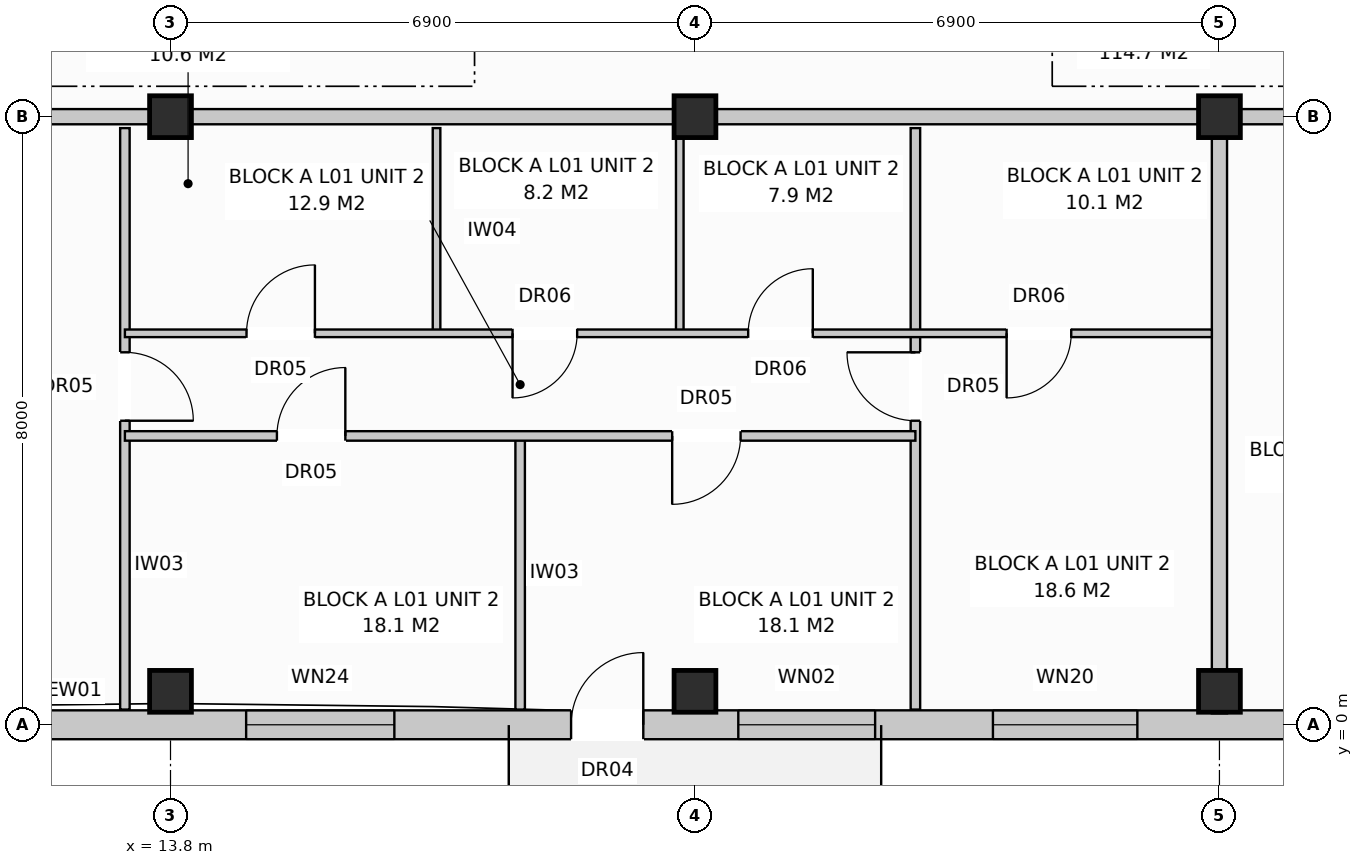
"""IFC4 building model, lengths in metres.
Left out: names, types, materials, properties, quantities, classifications, styles, units other than length and angle.
Written with IfcOpenShell. Run it as: python <this file> out.ifc"""

import sys

from ifc_helpers import new_model, si_unit, direction, frame, frame_2d, origin, origin_with_axes, origin_2d, place, context, subcontext, project, spatial, rectangle, extrude, element, fill, save


model = new_model("IFC4")
c1 = context("Model", 3, precision=1e-05, world=origin(), true_north=direction((0.0, 1.0)))
c2 = subcontext(c1, "Body", "Model", "MODEL_VIEW")
j1 = project(units=[si_unit("LENGTHUNIT", "METRE"), si_unit("PLANEANGLEUNIT", "RADIAN")], contexts=[c1])
p1 = place(None, origin())
s1 = spatial("IfcSite", under=j1, at=p1, CompositionType="ELEMENT")
p2 = place(p1, origin())
s2 = spatial("IfcBuilding", under=s1, at=p2, CompositionType="ELEMENT")
p3 = place(p2, frame((0.0, 0.0, 4.4)))
s3 = spatial("IfcBuildingStorey", under=s2, at=p3, CompositionType="ELEMENT", Elevation=4.4)
for number, where, z_axis, x_axis in (
    (1, (13.8, 0.44, 0.0), (0.0, 0.0, 1.0), (1.0, 0.0, 0.0)),
    (2, (13.8, 8.0, 0.0), (0.0, 0.0, 1.0), (1.0, 0.0, 0.0)),
    (3, (20.7, 0.44, 0.0), (0.0, 0.0, 1.0), (1.0, 0.0, 0.0)),
    (4, (20.7, 8.0, 0.0), (0.0, 0.0, 1.0), (1.0, 0.0, 0.0)),
    (5, (27.6, 0.44, 0.0), (0.0, 0.0, 1.0), (1.0, 0.0, 0.0)),
    (6, (27.6, 8.0, 0.0), (0.0, 0.0, 1.0), (1.0, 0.0, 0.0)),
):
    element("IfcColumn", number, at=place(p3, frame(where, z_axis=z_axis, x_axis=x_axis)), inside=s3, PredefinedType="COLUMN", context=c2, shape_type="SweptSolid", body=[
        extrude(rectangle(XDim=0.55, YDim=0.55, at=origin_2d()), origin(), (0.0, 0.0, 1.0), 3.6),
    ])
p4 = place(p3, frame((0.18, 0.0, 0.0), z_axis=(0.0, 0.0, 1.0), x_axis=(1.0, 0.0, 0.0)))
e7 = element("IfcWall", 7, at=p4, inside=s3, PredefinedType="STANDARD", context=c2, shape_type="SweptSolid", body=[
    extrude(rectangle(XDim=54.84, YDim=0.38, at=frame_2d((27.42, 0.0))), origin(), (0.0, 0.0, 1.0), 3.33),
])
p5 = place(p4, frame((5.09, 0.0, 0.0)))
e8 = element("IfcOpeningElement", 8, at=p5, cuts=e7, PredefinedType="OPENING", context=c2, shape_type="SweptSolid", body=[
    extrude(rectangle(XDim=0.95, YDim=2.1, at=frame_2d((0.475, 1.05))), frame((0.0, 0.202, 0.0), z_axis=(0.0, -1.0, 0.0), x_axis=(1.0, 0.0, 0.0)), (0.0, 0.0, 1.0), 0.404),
])
p6 = place(p4, frame((18.89, 0.0, 0.0)))
e9 = element("IfcOpeningElement", 9, at=p6, cuts=e7, PredefinedType="OPENING", context=c2, shape_type="SweptSolid", body=[
    extrude(rectangle(XDim=0.95, YDim=2.1, at=frame_2d((0.475, 1.05))), frame((0.0, 0.202, 0.0), z_axis=(0.0, -1.0, 0.0), x_axis=(1.0, 0.0, 0.0)), (0.0, 0.0, 1.0), 0.404),
])
p7 = place(p4, frame((32.69, 0.0, 0.0)))
e10 = element("IfcOpeningElement", 10, at=p7, cuts=e7, PredefinedType="OPENING", context=c2, shape_type="SweptSolid", body=[
    extrude(rectangle(XDim=0.95, YDim=2.1, at=frame_2d((0.475, 1.05))), frame((0.0, 0.202, 0.0), z_axis=(0.0, -1.0, 0.0), x_axis=(1.0, 0.0, 0.0)), (0.0, 0.0, 1.0), 0.404),
])
p8 = place(p4, frame((46.507, 0.0, 0.0)))
e11 = element("IfcOpeningElement", 11, at=p8, cuts=e7, PredefinedType="OPENING", context=c2, shape_type="SweptSolid", body=[
    extrude(rectangle(XDim=0.95, YDim=2.1, at=frame_2d((0.475, 1.05))), frame((0.0, 0.202, 0.0), z_axis=(0.0, -1.0, 0.0), x_axis=(1.0, 0.0, 0.0)), (0.0, 0.0, 1.0), 0.404),
])
p9 = place(p4, frame((0.89, 0.0, 0.8)))
e12 = element("IfcOpeningElement", 12, at=p9, cuts=e7, PredefinedType="OPENING", context=c2, shape_type="SweptSolid", body=[
    extrude(rectangle(XDim=1.8, YDim=1.7, at=frame_2d((0.9, 0.85))), frame((0.0, 0.202, 0.0), z_axis=(0.0, -1.0, 0.0), x_axis=(1.0, 0.0, 0.0)), (0.0, 0.0, 1.0), 0.404),
])
p10 = place(p4, frame((8.94, 0.0, 0.8)))
e13 = element("IfcOpeningElement", 13, at=p10, cuts=e7, PredefinedType="OPENING", context=c2, shape_type="SweptSolid", body=[
    extrude(rectangle(XDim=1.9, YDim=1.85, at=frame_2d((0.95, 0.925))), frame((0.0, 0.202, 0.0), z_axis=(0.0, -1.0, 0.0), x_axis=(1.0, 0.0, 0.0)), (0.0, 0.0, 1.0), 0.404),
])
p11 = place(p4, frame((14.615, 0.0, 0.8)))
e14 = element("IfcOpeningElement", 14, at=p11, cuts=e7, PredefinedType="OPENING", context=c2, shape_type="SweptSolid", body=[
    extrude(rectangle(XDim=1.95, YDim=1.65, at=frame_2d((0.975, 0.825))), frame((0.0, 0.202, 0.0), z_axis=(0.0, -1.0, 0.0), x_axis=(1.0, 0.0, 0.0)), (0.0, 0.0, 1.0), 0.404),
])
p12 = place(p4, frame((21.09, 0.0, 0.8)))
e15 = element("IfcOpeningElement", 15, at=p12, cuts=e7, PredefinedType="OPENING", context=c2, shape_type="SweptSolid", body=[
    extrude(rectangle(XDim=1.8, YDim=1.7, at=frame_2d((0.9, 0.85))), frame((0.0, 0.202, 0.0), z_axis=(0.0, -1.0, 0.0), x_axis=(1.0, 0.0, 0.0)), (0.0, 0.0, 1.0), 0.404),
])
p13 = place(p4, frame((24.44, 0.0, 0.8)))
e16 = element("IfcOpeningElement", 16, at=p13, cuts=e7, PredefinedType="OPENING", context=c2, shape_type="SweptSolid", body=[
    extrude(rectangle(XDim=1.9, YDim=1.85, at=frame_2d((0.95, 0.925))), frame((0.0, 0.202, 0.0), z_axis=(0.0, -1.0, 0.0), x_axis=(1.0, 0.0, 0.0)), (0.0, 0.0, 1.0), 0.404),
])
p14 = place(p4, frame((28.415, 0.0, 0.8)))
e17 = element("IfcOpeningElement", 17, at=p14, cuts=e7, PredefinedType="OPENING", context=c2, shape_type="SweptSolid", body=[
    extrude(rectangle(XDim=1.95, YDim=1.65, at=frame_2d((0.975, 0.825))), frame((0.0, 0.202, 0.0), z_axis=(0.0, -1.0, 0.0), x_axis=(1.0, 0.0, 0.0)), (0.0, 0.0, 1.0), 0.404),
])
p15 = place(p4, frame((35.59, 0.0, 0.8)))
e18 = element("IfcOpeningElement", 18, at=p15, cuts=e7, PredefinedType="OPENING", context=c2, shape_type="SweptSolid", body=[
    extrude(rectangle(XDim=1.8, YDim=1.7, at=frame_2d((0.9, 0.85))), frame((0.0, 0.202, 0.0), z_axis=(0.0, -1.0, 0.0), x_axis=(1.0, 0.0, 0.0)), (0.0, 0.0, 1.0), 0.404),
])
p16 = place(p4, frame((38.83, 0.0, 0.8)))
e19 = element("IfcOpeningElement", 19, at=p16, cuts=e7, PredefinedType="OPENING", context=c2, shape_type="SweptSolid", body=[
    extrude(rectangle(XDim=1.55, YDim=1.55, at=frame_2d((0.775, 0.775))), frame((0.0, 0.202, 0.0), z_axis=(0.0, -1.0, 0.0), x_axis=(1.0, 0.0, 0.0)), (0.0, 0.0, 1.0), 0.404),
])
p17 = place(p4, frame((42.415, 0.0, 0.8)))
e20 = element("IfcOpeningElement", 20, at=p17, cuts=e7, PredefinedType="OPENING", context=c2, shape_type="SweptSolid", body=[
    extrude(rectangle(XDim=1.95, YDim=1.65, at=frame_2d((0.975, 0.825))), frame((0.0, 0.202, 0.0), z_axis=(0.0, -1.0, 0.0), x_axis=(1.0, 0.0, 0.0)), (0.0, 0.0, 1.0), 0.404),
])
p18 = place(p4, frame((48.69, 0.0, 0.9)))
e21 = element("IfcOpeningElement", 21, at=p18, cuts=e7, PredefinedType="OPENING", context=c2, shape_type="SweptSolid", body=[
    extrude(rectangle(XDim=0.95, YDim=1.55, at=frame_2d((0.475, 0.775))), frame((0.0, 0.202, 0.0), z_axis=(0.0, -1.0, 0.0), x_axis=(1.0, 0.0, 0.0)), (0.0, 0.0, 1.0), 0.404),
])
p19 = place(p4, frame((51.44, 0.0, 0.8)))
e22 = element("IfcOpeningElement", 22, at=p19, cuts=e7, PredefinedType="OPENING", context=c2, shape_type="SweptSolid", body=[
    extrude(rectangle(XDim=1.9, YDim=1.85, at=frame_2d((0.95, 0.925))), frame((0.0, 0.202, 0.0), z_axis=(0.0, -1.0, 0.0), x_axis=(1.0, 0.0, 0.0)), (0.0, 0.0, 1.0), 0.404),
])
p20 = place(p3, frame((27.6, 7.85, 0.0), z_axis=(0.0, 0.0, 1.0), x_axis=(0.0, -1.0, 0.0)))
e23 = element("IfcWall", 23, at=p20, inside=s3, PredefinedType="PARTITIONING", context=c2, shape_type="SweptSolid", body=[
    extrude(rectangle(XDim=7.7, YDim=0.2, at=frame_2d((3.85, 0.0))), origin(), (0.0, 0.0, 1.0), 3.33),
])
p21 = place(p3, frame((6.9, 8.0, 0.0), z_axis=(0.0, 0.0, 1.0), x_axis=(1.0, 0.0, 0.0)))
e24 = element("IfcWall", 24, at=p21, inside=s3, PredefinedType="PARTITIONING", context=c2, shape_type="SweptSolid", body=[
    extrude(rectangle(XDim=20.7, YDim=0.2, at=frame_2d((10.35, 0.0))), origin(), (0.0, 0.0, 1.0), 2.77),
])
p22 = place(p21, frame((2.4, 0.0, 0.0)))
e25 = element("IfcOpeningElement", 25, at=p22, cuts=e24, PredefinedType="OPENING", context=c2, shape_type="SweptSolid", body=[
    extrude(rectangle(XDim=0.95, YDim=2.15, at=frame_2d((0.475, 1.075))), frame((0.0, 0.112, 0.0), z_axis=(0.0, -1.0, 0.0), x_axis=(1.0, 0.0, 0.0)), (0.0, 0.0, 1.0), 0.224),
])
p23 = place(p3, frame((13.2, 7.85, 0.0), z_axis=(0.0, 0.0, 1.0), x_axis=(0.0, -1.0, 0.0)))
e26 = element("IfcWall", 26, at=p23, inside=s3, PredefinedType="PARTITIONING", context=c2, shape_type="SweptSolid", body=[
    extrude(rectangle(XDim=7.65, YDim=0.125, at=frame_2d((3.825, 0.0))), origin(), (0.0, 0.0, 1.0), 3.33),
])
p24 = place(p23, frame((2.95, 0.0, 0.0)))
e27 = element("IfcOpeningElement", 27, at=p24, cuts=e26, PredefinedType="OPENING", context=c2, shape_type="SweptSolid", body=[
    extrude(rectangle(XDim=0.9, YDim=2.1, at=frame_2d((0.45, 1.05))), frame((0.0, 0.074, 0.0), z_axis=(0.0, -1.0, 0.0), x_axis=(1.0, 0.0, 0.0)), (0.0, 0.0, 1.0), 0.149),
])
for number, where, z_axis, x_axis in (
    (28, (17.3, 7.85, 0.0), (0.0, 0.0, 1.0), (0.0, -1.0, 0.0)),
    (29, (20.5, 7.85, 0.0), (0.0, 0.0, 1.0), (0.0, -1.0, 0.0)),
):
    element("IfcWall", number, at=place(p3, frame(where, z_axis=z_axis, x_axis=x_axis)), inside=s3, PredefinedType="PARTITIONING", context=c2, shape_type="SweptSolid", body=[
        extrude(rectangle(XDim=2.7, YDim=0.1, at=frame_2d((1.35, 0.0))), origin(), (0.0, 0.0, 1.0), 3.33),
    ])
p25 = place(p3, frame((18.4, 3.8, 0.0), z_axis=(0.0, 0.0, 1.0), x_axis=(0.0, -1.0, 0.0)))
e30 = element("IfcWall", 30, at=p25, inside=s3, PredefinedType="PARTITIONING", context=c2, shape_type="SweptSolid", body=[
    extrude(rectangle(XDim=3.6, YDim=0.125, at=frame_2d((1.8, 0.0))), origin(), (0.0, 0.0, 1.0), 3.33),
])
p26 = place(p3, frame((23.6, 7.85, 0.0), z_axis=(0.0, 0.0, 1.0), x_axis=(0.0, -1.0, 0.0)))
e31 = element("IfcWall", 31, at=p26, inside=s3, PredefinedType="PARTITIONING", context=c2, shape_type="SweptSolid", body=[
    extrude(rectangle(XDim=7.65, YDim=0.125, at=frame_2d((3.825, 0.0))), origin(), (0.0, 0.0, 1.0), 3.33),
])
p27 = place(p26, frame((2.95, 0.0, 0.0)))
e32 = element("IfcOpeningElement", 32, at=p27, cuts=e31, PredefinedType="OPENING", context=c2, shape_type="SweptSolid", body=[
    extrude(rectangle(XDim=0.9, YDim=2.1, at=frame_2d((0.45, 1.05))), frame((0.0, 0.074, 0.0), z_axis=(0.0, -1.0, 0.0), x_axis=(1.0, 0.0, 0.0)), (0.0, 0.0, 1.0), 0.149),
])
p28 = place(p3, frame((13.2, 5.15, 0.0), z_axis=(0.0, 0.0, 1.0), x_axis=(1.0, 0.0, 0.0)))
e33 = element("IfcWall", 33, at=p28, inside=s3, PredefinedType="PARTITIONING", context=c2, shape_type="SweptSolid", body=[
    extrude(rectangle(XDim=14.3, YDim=0.1, at=frame_2d((7.15, 0.0))), origin(), (0.0, 0.0, 1.0), 3.33),
])
p29 = place(p28, frame((1.6, 0.0, 0.0)))
e34 = element("IfcOpeningElement", 34, at=p29, cuts=e33, PredefinedType="OPENING", context=c2, shape_type="SweptSolid", body=[
    extrude(rectangle(XDim=0.9, YDim=2.1, at=frame_2d((0.45, 1.05))), frame((0.0, 0.062, 0.0), z_axis=(0.0, -1.0, 0.0), x_axis=(1.0, 0.0, 0.0)), (0.0, 0.0, 1.0), 0.124),
])
p30 = place(p28, frame((5.1, 0.0, 0.0)))
e35 = element("IfcOpeningElement", 35, at=p30, cuts=e33, PredefinedType="OPENING", context=c2, shape_type="SweptSolid", body=[
    extrude(rectangle(XDim=0.85, YDim=2.05, at=frame_2d((0.425, 1.025))), frame((0.0, 0.062, 0.0), z_axis=(0.0, -1.0, 0.0), x_axis=(1.0, 0.0, 0.0)), (0.0, 0.0, 1.0), 0.124),
])
p31 = place(p28, frame((8.2, 0.0, 0.0)))
e36 = element("IfcOpeningElement", 36, at=p31, cuts=e33, PredefinedType="OPENING", context=c2, shape_type="SweptSolid", body=[
    extrude(rectangle(XDim=0.85, YDim=2.05, at=frame_2d((0.425, 1.025))), frame((0.0, 0.062, 0.0), z_axis=(0.0, -1.0, 0.0), x_axis=(1.0, 0.0, 0.0)), (0.0, 0.0, 1.0), 0.124),
])
p32 = place(p28, frame((11.6, 0.0, 0.0)))
e37 = element("IfcOpeningElement", 37, at=p32, cuts=e33, PredefinedType="OPENING", context=c2, shape_type="SweptSolid", body=[
    extrude(rectangle(XDim=0.85, YDim=2.05, at=frame_2d((0.425, 1.025))), frame((0.0, 0.062, 0.0), z_axis=(0.0, -1.0, 0.0), x_axis=(1.0, 0.0, 0.0)), (0.0, 0.0, 1.0), 0.124),
])
p33 = place(p3, frame((13.2, 3.8, 0.0), z_axis=(0.0, 0.0, 1.0), x_axis=(1.0, 0.0, 0.0)))
e38 = element("IfcWall", 38, at=p33, inside=s3, PredefinedType="PARTITIONING", context=c2, shape_type="SweptSolid", body=[
    extrude(rectangle(XDim=10.4, YDim=0.125, at=frame_2d((5.2, 0.0))), origin(), (0.0, 0.0, 1.0), 3.33),
])
p34 = place(p33, frame((2.0, 0.0, 0.0)))
e39 = element("IfcOpeningElement", 39, at=p34, cuts=e38, PredefinedType="OPENING", context=c2, shape_type="SweptSolid", body=[
    extrude(rectangle(XDim=0.9, YDim=2.1, at=frame_2d((0.45, 1.05))), frame((0.0, 0.074, 0.0), z_axis=(0.0, -1.0, 0.0), x_axis=(1.0, 0.0, 0.0)), (0.0, 0.0, 1.0), 0.149),
])
p35 = place(p33, frame((7.2, 0.0, 0.0)))
e40 = element("IfcOpeningElement", 40, at=p35, cuts=e38, PredefinedType="OPENING", context=c2, shape_type="SweptSolid", body=[
    extrude(rectangle(XDim=0.9, YDim=2.1, at=frame_2d((0.45, 1.05))), frame((0.0, 0.074, 0.0), z_axis=(0.0, -1.0, 0.0), x_axis=(1.0, 0.0, 0.0)), (0.0, 0.0, 1.0), 0.149),
])
p36 = place(p3, frame((27.6, 8.0, 0.0), z_axis=(0.0, 0.0, 1.0), x_axis=(1.0, 0.0, 0.0)))
e41 = element("IfcWall", 41, at=p36, inside=s3, PredefinedType="PARTITIONING", context=c2, shape_type="SweptSolid", body=[
    extrude(rectangle(XDim=6.9, YDim=0.2, at=frame_2d((3.45, 0.0))), origin(), (0.0, 0.0, 1.0), 2.77),
])
p37 = place(p36, frame((2.0, 0.0, 0.0)))
e42 = element("IfcOpeningElement", 42, at=p37, cuts=e41, PredefinedType="OPENING", context=c2, shape_type="SweptSolid", body=[
    extrude(rectangle(XDim=0.95, YDim=2.15, at=frame_2d((0.475, 1.075))), frame((0.0, 0.112, 0.0), z_axis=(0.0, -1.0, 0.0), x_axis=(1.0, 0.0, 0.0)), (0.0, 0.0, 1.0), 0.224),
])
p38 = place(p6, origin_with_axes())
e43 = element("IfcDoor", 43, at=p38, inside=s3, OperationType="SINGLE_SWING_RIGHT", PredefinedType="DOOR", context=c2, shape_type="SweptSolid", body=[
    extrude(rectangle(XDim=0.95, YDim=2.1, at=frame_2d((0.475, 1.05))), frame((0.0, 0.025, 0.0), z_axis=(0.0, -1.0, 0.0), x_axis=(1.0, 0.0, 0.0)), (0.0, 0.0, 1.0), 0.05),
])
fill(e9, e43)
p39 = place(p11, origin_with_axes())
e44 = element("IfcWindow", 44, at=p39, inside=s3, PartitioningType="SINGLE_PANEL", PredefinedType="WINDOW", context=c2, shape_type="SweptSolid", body=[
    extrude(rectangle(XDim=1.95, YDim=1.65, at=frame_2d((0.975, 0.825))), frame((0.0, 0.03, 0.0), z_axis=(0.0, -1.0, 0.0), x_axis=(1.0, 0.0, 0.0)), (0.0, 0.0, 1.0), 0.06),
])
fill(e14, e44)
p40 = place(p12, origin_with_axes())
e45 = element("IfcWindow", 45, at=p40, inside=s3, PartitioningType="SINGLE_PANEL", PredefinedType="WINDOW", context=c2, shape_type="SweptSolid", body=[
    extrude(rectangle(XDim=1.8, YDim=1.7, at=frame_2d((0.9, 0.85))), frame((0.0, 0.03, 0.0), z_axis=(0.0, -1.0, 0.0), x_axis=(1.0, 0.0, 0.0)), (0.0, 0.0, 1.0), 0.06),
])
fill(e15, e45)
p41 = place(p13, origin_with_axes())
e46 = element("IfcWindow", 46, at=p41, inside=s3, PartitioningType="SINGLE_PANEL", PredefinedType="WINDOW", context=c2, shape_type="SweptSolid", body=[
    extrude(rectangle(XDim=1.9, YDim=1.85, at=frame_2d((0.95, 0.925))), frame((0.0, 0.03, 0.0), z_axis=(0.0, -1.0, 0.0), x_axis=(1.0, 0.0, 0.0)), (0.0, 0.0, 1.0), 0.06),
])
fill(e16, e46)
p42 = place(p24, origin_with_axes())
e47 = element("IfcDoor", 47, at=p42, inside=s3, OperationType="SINGLE_SWING_RIGHT", PredefinedType="DOOR", context=c2, shape_type="SweptSolid", body=[
    extrude(rectangle(XDim=0.9, YDim=2.1, at=frame_2d((0.45, 1.05))), frame((0.0, 0.025, 0.0), z_axis=(0.0, -1.0, 0.0), x_axis=(1.0, 0.0, 0.0)), (0.0, 0.0, 1.0), 0.05),
])
fill(e27, e47)
p43 = place(p27, frame((0.9, 0.0, 0.0), z_axis=(0.0, 0.0, 1.0), x_axis=(-1.0, 0.0, 0.0)))
e48 = element("IfcDoor", 48, at=p43, inside=s3, OperationType="SINGLE_SWING_LEFT", PredefinedType="DOOR", context=c2, shape_type="SweptSolid", body=[
    extrude(rectangle(XDim=0.9, YDim=2.1, at=frame_2d((0.45, 1.05))), frame((0.0, 0.025, 0.0), z_axis=(0.0, -1.0, 0.0), x_axis=(1.0, 0.0, 0.0)), (0.0, 0.0, 1.0), 0.05),
])
fill(e32, e48)
p44 = place(p29, origin_with_axes())
e49 = element("IfcDoor", 49, at=p44, inside=s3, OperationType="SINGLE_SWING_RIGHT", PredefinedType="DOOR", context=c2, shape_type="SweptSolid", body=[
    extrude(rectangle(XDim=0.9, YDim=2.1, at=frame_2d((0.45, 1.05))), frame((0.0, 0.025, 0.0), z_axis=(0.0, -1.0, 0.0), x_axis=(1.0, 0.0, 0.0)), (0.0, 0.0, 1.0), 0.05),
])
fill(e34, e49)
p45 = place(p30, frame((0.85, 0.0, 0.0), z_axis=(0.0, 0.0, 1.0), x_axis=(-1.0, 0.0, 0.0)))
e50 = element("IfcDoor", 50, at=p45, inside=s3, OperationType="SINGLE_SWING_LEFT", PredefinedType="DOOR", context=c2, shape_type="SweptSolid", body=[
    extrude(rectangle(XDim=0.85, YDim=2.05, at=frame_2d((0.425, 1.025))), frame((0.0, 0.025, 0.0), z_axis=(0.0, -1.0, 0.0), x_axis=(1.0, 0.0, 0.0)), (0.0, 0.0, 1.0), 0.05),
])
fill(e35, e50)
p46 = place(p31, origin_with_axes())
e51 = element("IfcDoor", 51, at=p46, inside=s3, OperationType="SINGLE_SWING_RIGHT", PredefinedType="DOOR", context=c2, shape_type="SweptSolid", body=[
    extrude(rectangle(XDim=0.85, YDim=2.05, at=frame_2d((0.425, 1.025))), frame((0.0, 0.025, 0.0), z_axis=(0.0, -1.0, 0.0), x_axis=(1.0, 0.0, 0.0)), (0.0, 0.0, 1.0), 0.05),
])
fill(e36, e51)
p47 = place(p32, frame((0.85, 0.0, 0.0), z_axis=(0.0, 0.0, 1.0), x_axis=(-1.0, 0.0, 0.0)))
e52 = element("IfcDoor", 52, at=p47, inside=s3, OperationType="SINGLE_SWING_LEFT", PredefinedType="DOOR", context=c2, shape_type="SweptSolid", body=[
    extrude(rectangle(XDim=0.85, YDim=2.05, at=frame_2d((0.425, 1.025))), frame((0.0, 0.025, 0.0), z_axis=(0.0, -1.0, 0.0), x_axis=(1.0, 0.0, 0.0)), (0.0, 0.0, 1.0), 0.05),
])
fill(e37, e52)
p48 = place(p34, origin_with_axes())
e53 = element("IfcDoor", 53, at=p48, inside=s3, OperationType="SINGLE_SWING_RIGHT", PredefinedType="DOOR", context=c2, shape_type="SweptSolid", body=[
    extrude(rectangle(XDim=0.9, YDim=2.1, at=frame_2d((0.45, 1.05))), frame((0.0, 0.025, 0.0), z_axis=(0.0, -1.0, 0.0), x_axis=(1.0, 0.0, 0.0)), (0.0, 0.0, 1.0), 0.05),
])
fill(e39, e53)
p49 = place(p35, frame((0.9, 0.0, 0.0), z_axis=(0.0, 0.0, 1.0), x_axis=(-1.0, 0.0, 0.0)))
e54 = element("IfcDoor", 54, at=p49, inside=s3, OperationType="SINGLE_SWING_LEFT", PredefinedType="DOOR", context=c2, shape_type="SweptSolid", body=[
    extrude(rectangle(XDim=0.9, YDim=2.1, at=frame_2d((0.45, 1.05))), frame((0.0, 0.025, 0.0), z_axis=(0.0, -1.0, 0.0), x_axis=(1.0, 0.0, 0.0)), (0.0, 0.0, 1.0), 0.05),
])
fill(e40, e54)
save(model, sys.argv[1])
